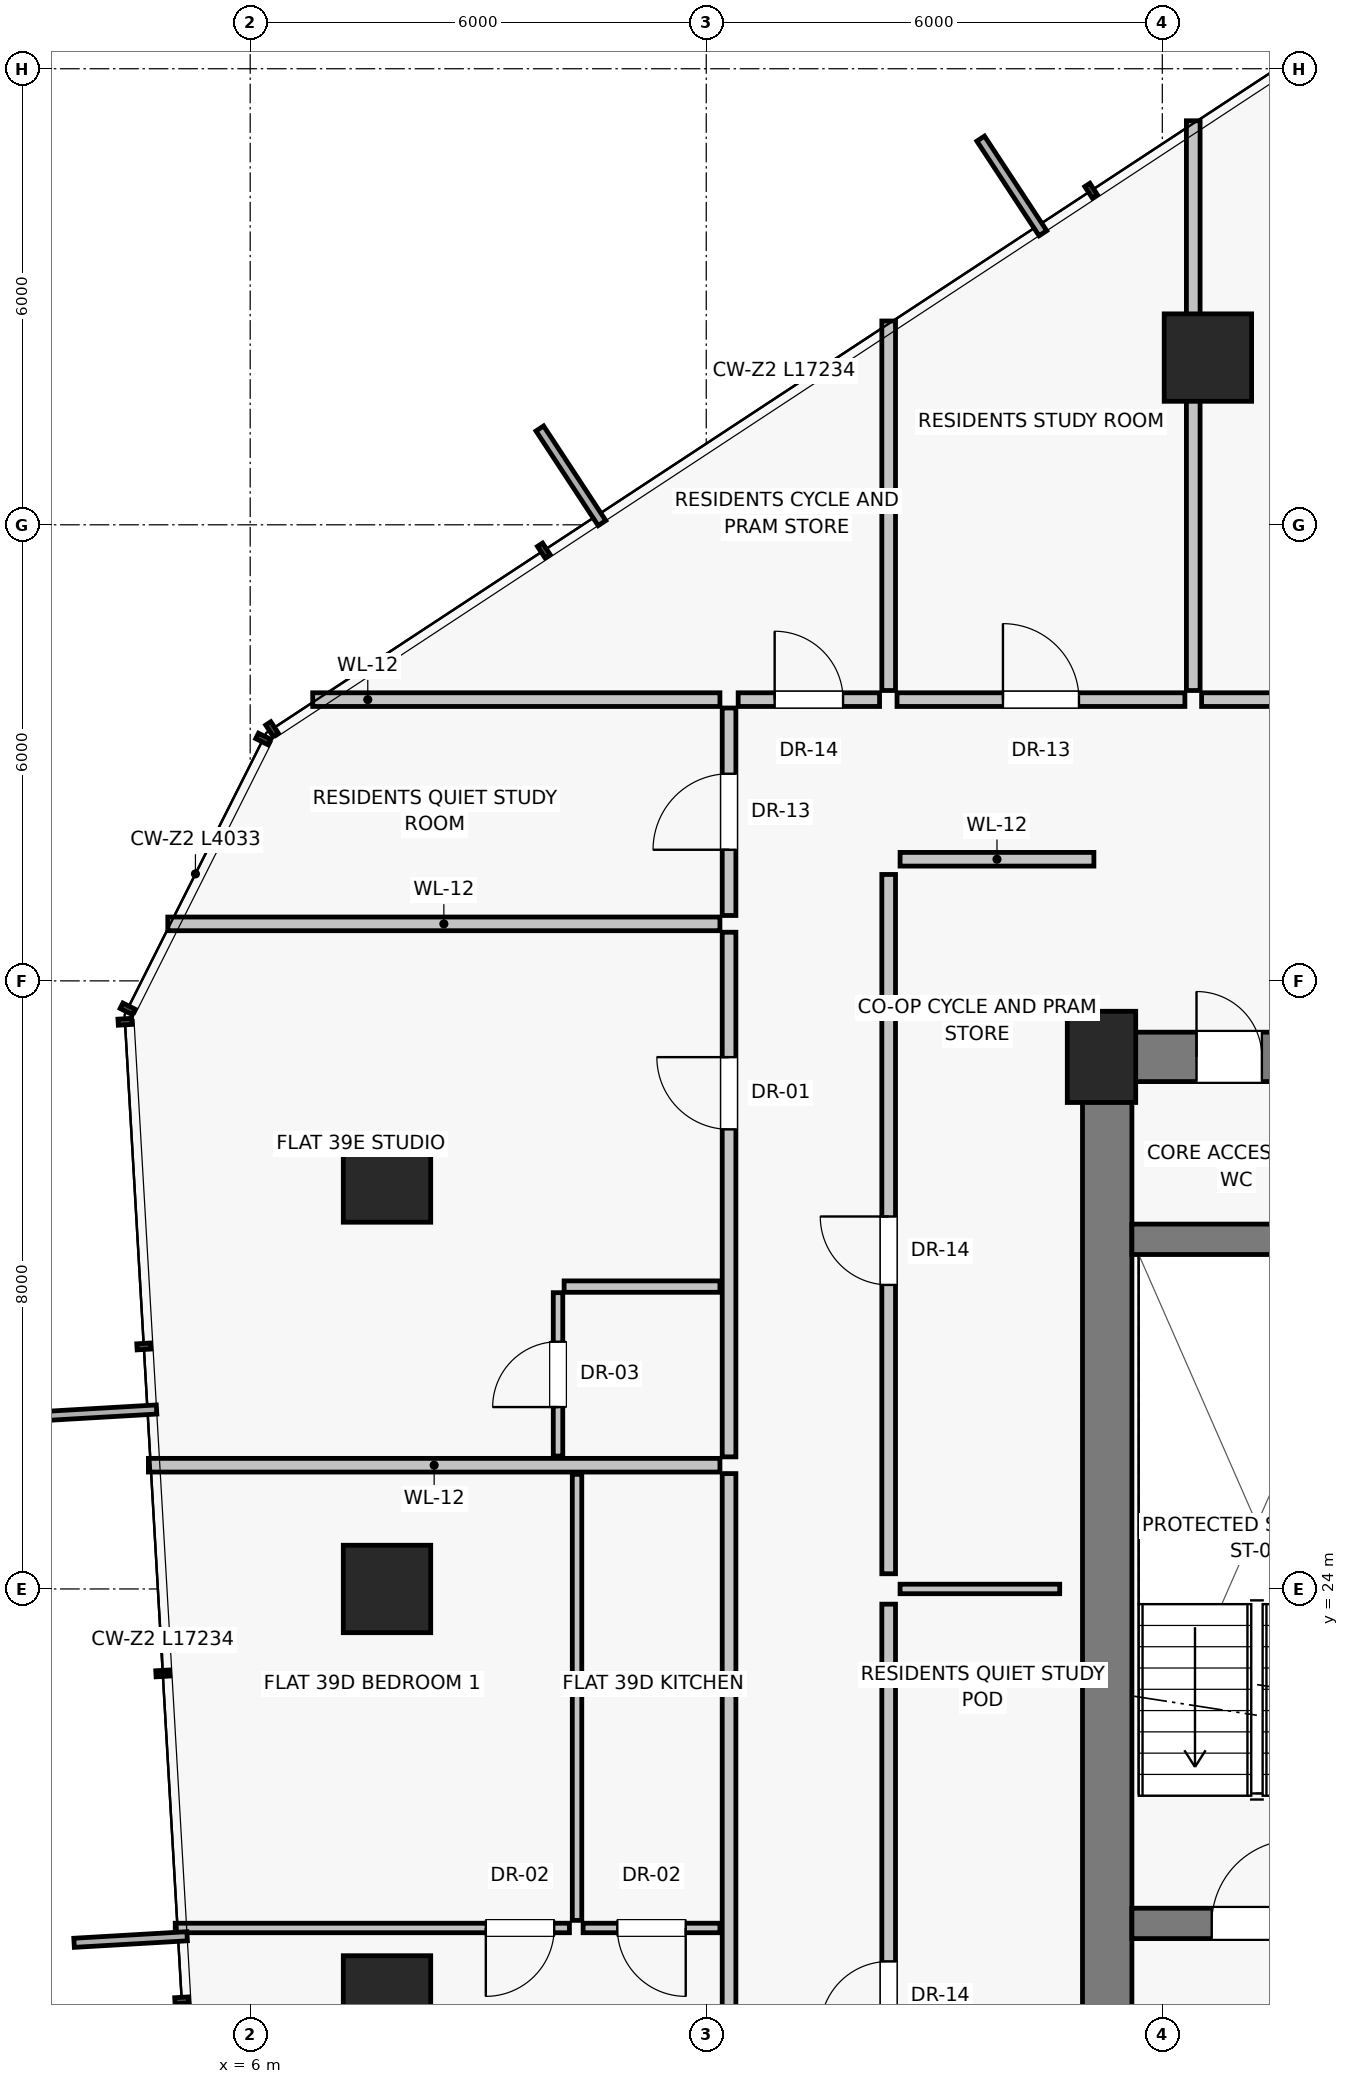
"""IFC4 building model, lengths in metres.
Left out: names, types, materials, properties, quantities, classifications, styles, units other than length and angle.
Written with IfcOpenShell. Run it as: python <this file> out.ifc"""

import sys

from ifc_helpers import new_model, si_unit, direction, frame, frame_2d, origin, origin_2d, place, context, subcontext, project, spatial, rectangle, extrude, source, transform, mapped, element, fill, save


model = new_model("IFC4")
c1 = context("Model", 3, precision=1e-05, world=origin(), true_north=direction((0.0, 1.0)))
c2 = subcontext(c1, "Body", "Model", "MODEL_VIEW")
j1 = project(units=[si_unit("LENGTHUNIT", "METRE"), si_unit("PLANEANGLEUNIT", "RADIAN")], contexts=[c1])
p1 = place(None, origin())
s1 = spatial("IfcSite", under=j1, at=p1, CompositionType="ELEMENT")
p2 = place(p1, origin())
s2 = spatial("IfcBuilding", under=s1, at=p2, CompositionType="ELEMENT")
p3 = place(p2, frame((0.0, 0.0, 139.25)))
s3 = spatial("IfcBuildingStorey", under=s2, at=p3, CompositionType="ELEMENT", Elevation=139.25)
p4 = place(p3, frame((17.2, 31.0, 0.0), z_axis=(0.0, 0.0, 1.0), x_axis=(1.0, 0.0, 0.0)))
e1 = element("IfcColumn", 1, at=p4, inside=s3, PredefinedType="PILASTER", context=c2, shape_type="SweptSolid", body=[
    extrude(rectangle(XDim=0.9, YDim=1.2, at=origin_2d()), origin(), (0.0, 0.0, 1.0), 3.25),
])
for number, where, z_axis, x_axis in (
    (2, (18.6, 40.2, 0.0), (0.0, 0.0, 1.0), (1.0, 0.0, 0.0)),
    (3, (7.8, 29.4, 0.0), (0.0, 0.0, 1.0), (1.0, 0.0, 0.0)),
    (4, (7.8, 24.0, 0.0), (0.0, 0.0, 1.0), (1.0, 0.0, 0.0)),
    (5, (7.8, 18.6, 0.0), (0.0, 0.0, 1.0), (1.0, 0.0, 0.0)),
):
    element("IfcColumn", number, at=place(p3, frame(where, z_axis=z_axis, x_axis=x_axis)), inside=s3, PredefinedType="COLUMN", context=c2, shape_type="SweptSolid", body=[
        extrude(rectangle(XDim=1.15, YDim=1.15, at=origin_2d()), origin(), (0.0, 0.0, 1.0), 3.25),
    ])
p5 = place(p3, frame((17.275, 16.8, 0.0), z_axis=(0.0, 0.0, 1.0), x_axis=(0.0, 1.0, 0.0)))
e6 = element("IfcWall", 6, at=p5, inside=s3, PredefinedType="SHEAR", context=c2, shape_type="SweptSolid", body=[
    extrude(rectangle(XDim=14.2, YDim=0.65, at=frame_2d((7.1, 0.0))), origin(), (0.0, 0.0, 1.0), 3.0),
])
p6 = place(p3, frame((17.2, 31.0, 0.0), z_axis=(0.0, 0.0, 1.0), x_axis=(1.0, 0.0, 0.0)))
e7 = element("IfcWall", 7, at=p6, inside=s3, PredefinedType="SHEAR", context=c2, shape_type="SweptSolid", body=[
    extrude(rectangle(XDim=3.8, YDim=0.65, at=frame_2d((1.9, 0.0))), origin(), (0.0, 0.0, 1.0), 3.0),
])
p7 = place(p6, frame((1.25, 0.0, 0.0)))
e8 = element("IfcOpeningElement", 8, at=p7, cuts=e7, PredefinedType="OPENING", context=c2, shape_type="SweptSolid", body=[
    extrude(rectangle(XDim=0.86, YDim=2.01, at=frame_2d((0.43, 1.005))), frame((0.0, 0.335, 0.0), z_axis=(0.0, -1.0, 0.0), x_axis=(1.0, 0.0, 0.0)), (0.0, 0.0, 1.0), 0.67),
])
p8 = place(p3, frame((17.6, 19.6, 0.0), z_axis=(0.0, 0.0, 1.0), x_axis=(1.0, 0.0, 0.0)))
e9 = element("IfcWall", 9, at=p8, inside=s3, PredefinedType="SHEAR", context=c2, shape_type="SweptSolid", body=[
    extrude(rectangle(XDim=3.4, YDim=0.4, at=frame_2d((1.7, 0.0))), origin(), (0.0, 0.0, 1.0), 3.0),
])
p9 = place(p8, frame((1.05, 0.0, 0.0)))
e10 = element("IfcOpeningElement", 10, at=p9, cuts=e9, PredefinedType="OPENING", context=c2, shape_type="SweptSolid", body=[
    extrude(rectangle(XDim=1.1, YDim=2.03, at=frame_2d((0.55, 1.015))), frame((0.0, 0.21, 0.0), z_axis=(0.0, -1.0, 0.0), x_axis=(1.0, 0.0, 0.0)), (0.0, 0.0, 1.0), 0.42),
])
p10 = place(p3, frame((17.6, 28.6, 0.0), z_axis=(0.0, 0.0, 1.0), x_axis=(1.0, 0.0, 0.0)))
e11 = element("IfcWall", 11, at=p10, inside=s3, PredefinedType="SHEAR", context=c2, shape_type="SweptSolid", body=[
    extrude(rectangle(XDim=3.4, YDim=0.4, at=frame_2d((1.7, 0.0))), origin(), (0.0, 0.0, 1.0), 3.0),
])
p11 = place(p3, frame((14.4, 14.4, 0.0), z_axis=(0.0, 0.0, 1.0), x_axis=(0.0, 1.0, 0.0)))
e12 = element("IfcWall", 12, at=p11, inside=s3, PredefinedType="PARTITIONING", context=c2, shape_type="SweptSolid", body=[
    extrude(rectangle(XDim=9.4, YDim=0.18, at=frame_2d((4.7, 0.0))), origin(), (0.0, 0.0, 1.0), 3.0),
])
p12 = place(p11, frame((3.8, 0.0, 0.0)))
e13 = element("IfcOpeningElement", 13, at=p12, cuts=e12, PredefinedType="OPENING", context=c2, shape_type="SweptSolid", body=[
    extrude(rectangle(XDim=0.9, YDim=2.01, at=frame_2d((0.45, 1.005))), frame((0.0, 0.1, 0.0), z_axis=(0.0, -1.0, 0.0), x_axis=(1.0, 0.0, 0.0)), (0.0, 0.0, 1.0), 0.2),
])
p13 = place(p3, frame((14.4, 24.2, 0.0), z_axis=(0.0, 0.0, 1.0), x_axis=(0.0, 1.0, 0.0)))
e14 = element("IfcWall", 14, at=p13, inside=s3, PredefinedType="PARTITIONING", context=c2, shape_type="SweptSolid", body=[
    extrude(rectangle(XDim=9.2, YDim=0.18, at=frame_2d((4.6, 0.0))), origin(), (0.0, 0.0, 1.0), 3.0),
])
p14 = place(p13, frame((3.8, 0.0, 0.0)))
e15 = element("IfcOpeningElement", 15, at=p14, cuts=e14, PredefinedType="OPENING", context=c2, shape_type="SweptSolid", body=[
    extrude(rectangle(XDim=0.9, YDim=2.01, at=frame_2d((0.45, 1.005))), frame((0.0, 0.1, 0.0), z_axis=(0.0, -1.0, 0.0), x_axis=(1.0, 0.0, 0.0)), (0.0, 0.0, 1.0), 0.2),
])
p15 = place(p3, frame((14.55, 24.0, 0.0), z_axis=(0.0, 0.0, 1.0), x_axis=(1.0, 0.0, 0.0)))
e16 = element("IfcWall", 16, at=p15, inside=s3, PredefinedType="PARTITIONING", context=c2, shape_type="SweptSolid", body=[
    extrude(rectangle(XDim=2.1, YDim=0.125, at=frame_2d((1.05, 0.0))), origin(), (0.0, 0.0, 1.0), 3.0),
])
p16 = place(p3, frame((14.55, 33.6, 0.0), z_axis=(0.0, 0.0, 1.0), x_axis=(1.0, 0.0, 0.0)))
e17 = element("IfcWall", 17, at=p16, inside=s3, PredefinedType="PARTITIONING", context=c2, shape_type="SweptSolid", body=[
    extrude(rectangle(XDim=2.55, YDim=0.18, at=frame_2d((1.275, 0.0))), origin(), (0.0, 0.0, 1.0), 3.0),
])
p17 = place(p3, frame((14.4, 35.82, 0.0), z_axis=(0.0, 0.0, 1.0), x_axis=(0.0, 1.0, 0.0)))
e18 = element("IfcWall", 18, at=p17, inside=s3, PredefinedType="PARTITIONING", context=c2, shape_type="SweptSolid", body=[
    extrude(rectangle(XDim=4.861, YDim=0.18, at=frame_2d((2.431, 0.0))), origin(), (0.0, 0.0, 1.0), 3.0),
])
p18 = place(p3, frame((14.51, 35.7, 0.0), z_axis=(0.0, 0.0, 1.0), x_axis=(1.0, 0.0, 0.0)))
e19 = element("IfcWall", 19, at=p18, inside=s3, PredefinedType="PARTITIONING", context=c2, shape_type="SweptSolid", body=[
    extrude(rectangle(XDim=3.787, YDim=0.18, at=frame_2d((1.894, 0.0))), origin(), (0.0, 0.0, 1.0), 2.58),
])
p19 = place(p18, frame((1.394, 0.0, 0.0)))
e20 = element("IfcOpeningElement", 20, at=p19, cuts=e19, PredefinedType="OPENING", context=c2, shape_type="SweptSolid", body=[
    extrude(rectangle(XDim=1.0, YDim=2.01, at=frame_2d((0.5, 1.005))), frame((0.0, 0.1, 0.0), z_axis=(0.0, -1.0, 0.0), x_axis=(1.0, 0.0, 0.0)), (0.0, 0.0, 1.0), 0.2),
])
p20 = place(p3, frame((18.517, 35.7, 0.0), z_axis=(0.0, 0.0, 1.0), x_axis=(1.0, 0.0, 0.0)))
e21 = element("IfcWall", 21, at=p20, inside=s3, PredefinedType="PARTITIONING", context=c2, shape_type="SweptSolid", body=[
    extrude(rectangle(XDim=6.317, YDim=0.18, at=frame_2d((3.158, 0.0))), origin(), (0.0, 0.0, 1.0), 2.58),
])
p21 = place(p20, frame((2.658, 0.0, 0.0)))
e22 = element("IfcOpeningElement", 22, at=p21, cuts=e21, PredefinedType="OPENING", context=c2, shape_type="SweptSolid", body=[
    extrude(rectangle(XDim=1.0, YDim=2.01, at=frame_2d((0.5, 1.005))), frame((0.0, 0.1, 0.0), z_axis=(0.0, -1.0, 0.0), x_axis=(1.0, 0.0, 0.0)), (0.0, 0.0, 1.0), 0.2),
])
p22 = place(p3, frame((18.407, 35.82, 0.0), z_axis=(0.0, 0.0, 1.0), x_axis=(0.0, 1.0, 0.0)))
e23 = element("IfcWall", 23, at=p22, inside=s3, PredefinedType="PARTITIONING", context=c2, shape_type="SweptSolid", body=[
    extrude(rectangle(XDim=7.495, YDim=0.18, at=frame_2d((3.748, 0.0))), origin(), (0.0, 0.0, 1.0), 2.378),
])
p23 = place(p3, frame((12.18, 35.7, 0.0), z_axis=(0.0, 0.0, 1.0), x_axis=(-1.0, 0.0, 0.0)))
e24 = element("IfcWall", 24, at=p23, inside=s3, PredefinedType="PARTITIONING", context=c2, shape_type="SweptSolid", body=[
    extrude(rectangle(XDim=5.357, YDim=0.18, at=frame_2d((2.679, 0.0))), origin(), (0.0, 0.0, 1.0), 3.0),
])
p24 = place(p3, frame((12.3, 12.21, 0.0), z_axis=(0.0, 0.0, 1.0), x_axis=(0.0, 1.0, 0.0)))
e25 = element("IfcWall", 25, at=p24, inside=s3, PredefinedType="PARTITIONING", context=c2, shape_type="SweptSolid", body=[
    extrude(rectangle(XDim=13.308, YDim=0.18, at=frame_2d((6.654, 0.0))), origin(), (0.0, 0.0, 1.0), 2.58),
])
p25 = place(p24, frame((4.26, 0.0, 0.0)))
e26 = element("IfcOpeningElement", 26, at=p25, cuts=e25, PredefinedType="OPENING", context=c2, shape_type="SweptSolid", body=[
    extrude(rectangle(XDim=0.95, YDim=2.02, at=frame_2d((0.475, 1.01))), frame((0.0, 0.1, 0.0), z_axis=(0.0, -1.0, 0.0), x_axis=(1.0, 0.0, 0.0)), (0.0, 0.0, 1.0), 0.2),
])
p26 = place(p3, frame((12.18, 19.54, 0.0), z_axis=(0.0, 0.0, 1.0), x_axis=(-1.0, 0.0, 0.0)))
e27 = element("IfcWall", 27, at=p26, inside=s3, PredefinedType="PARTITIONING", context=c2, shape_type="SweptSolid", body=[
    extrude(rectangle(XDim=1.8, YDim=0.125, at=frame_2d((0.9, 0.0))), origin(), (0.0, 0.0, 1.0), 3.0),
])
p27 = place(p26, frame((0.45, 0.0, 0.0)))
e28 = element("IfcOpeningElement", 28, at=p27, cuts=e27, PredefinedType="OPENING", context=c2, shape_type="SweptSolid", body=[
    extrude(rectangle(XDim=0.9, YDim=2.01, at=frame_2d((0.45, 1.005))), frame((0.0, 0.073, 0.0), z_axis=(0.0, -1.0, 0.0), x_axis=(1.0, 0.0, 0.0)), (0.0, 0.0, 1.0), 0.145),
])
p28 = place(p3, frame((10.3, 19.64, 0.0), z_axis=(0.0, 0.0, 1.0), x_axis=(0.0, 1.0, 0.0)))
e29 = element("IfcWall", 29, at=p28, inside=s3, PredefinedType="PARTITIONING", context=c2, shape_type="SweptSolid", body=[
    extrude(rectangle(XDim=5.868, YDim=0.125, at=frame_2d((2.934, 0.0))), origin(), (0.0, 0.0, 1.0), 3.0),
])
p29 = place(p3, frame((10.2, 19.54, 0.0), z_axis=(0.0, 0.0, 1.0), x_axis=(-1.0, 0.0, 0.0)))
e30 = element("IfcWall", 30, at=p29, inside=s3, PredefinedType="PARTITIONING", context=c2, shape_type="SweptSolid", body=[
    extrude(rectangle(XDim=5.186, YDim=0.125, at=frame_2d((2.593, 0.0))), origin(), (0.0, 0.0, 1.0), 3.0),
])
p30 = place(p29, frame((0.2, 0.0, 0.0)))
e31 = element("IfcOpeningElement", 31, at=p30, cuts=e30, PredefinedType="OPENING", context=c2, shape_type="SweptSolid", body=[
    extrude(rectangle(XDim=0.9, YDim=2.01, at=frame_2d((0.45, 1.005))), frame((0.0, 0.073, 0.0), z_axis=(0.0, -1.0, 0.0), x_axis=(1.0, 0.0, 0.0)), (0.0, 0.0, 1.0), 0.145),
])
p31 = place(p3, frame((12.18, 25.628, 0.0), z_axis=(0.0, 0.0, 1.0), x_axis=(-1.0, 0.0, 0.0)))
e32 = element("IfcWall", 32, at=p31, inside=s3, PredefinedType="PARTITIONING", context=c2, shape_type="SweptSolid", body=[
    extrude(rectangle(XDim=7.519, YDim=0.18, at=frame_2d((3.76, 0.0))), origin(), (0.0, 0.0, 1.0), 3.0),
])
p32 = place(p3, frame((12.3, 32.86, 0.0), z_axis=(0.0, 0.0, 1.0), x_axis=(0.0, 1.0, 0.0)))
e33 = element("IfcWall", 33, at=p32, inside=s3, PredefinedType="PARTITIONING", context=c2, shape_type="SweptSolid", body=[
    extrude(rectangle(XDim=2.73, YDim=0.18, at=frame_2d((1.365, 0.0))), origin(), (0.0, 0.0, 1.0), 3.0),
])
p33 = place(p32, frame((0.865, 0.0, 0.0)))
e34 = element("IfcOpeningElement", 34, at=p33, cuts=e33, PredefinedType="OPENING", context=c2, shape_type="SweptSolid", body=[
    extrude(rectangle(XDim=1.0, YDim=2.01, at=frame_2d((0.5, 1.005))), frame((0.0, 0.1, 0.0), z_axis=(0.0, -1.0, 0.0), x_axis=(1.0, 0.0, 0.0)), (0.0, 0.0, 1.0), 0.2),
])
p34 = place(p3, frame((12.18, 32.75, 0.0), z_axis=(0.0, 0.0, 1.0), x_axis=(-1.0, 0.0, 0.0)))
e35 = element("IfcWall", 35, at=p34, inside=s3, PredefinedType="PARTITIONING", context=c2, shape_type="SweptSolid", body=[
    extrude(rectangle(XDim=7.264, YDim=0.18, at=frame_2d((3.632, 0.0))), origin(), (0.0, 0.0, 1.0), 3.0),
])
p35 = place(p3, frame((12.3, 25.738, 0.0), z_axis=(0.0, 0.0, 1.0), x_axis=(0.0, 1.0, 0.0)))
e36 = element("IfcWall", 36, at=p35, inside=s3, PredefinedType="PARTITIONING", context=c2, shape_type="SweptSolid", body=[
    extrude(rectangle(XDim=6.902, YDim=0.18, at=frame_2d((3.451, 0.0))), origin(), (0.0, 0.0, 1.0), 2.58),
])
p36 = place(p35, frame((4.309, 0.0, 0.0)))
e37 = element("IfcOpeningElement", 37, at=p36, cuts=e36, PredefinedType="OPENING", context=c2, shape_type="SweptSolid", body=[
    extrude(rectangle(XDim=0.95, YDim=2.02, at=frame_2d((0.475, 1.01))), frame((0.0, 0.1, 0.0), z_axis=(0.0, -1.0, 0.0), x_axis=(1.0, 0.0, 0.0)), (0.0, 0.0, 1.0), 0.2),
])
p37 = place(p3, frame((12.18, 27.978, 0.0), z_axis=(0.0, 0.0, 1.0), x_axis=(-1.0, 0.0, 0.0)))
e38 = element("IfcWall", 38, at=p37, inside=s3, PredefinedType="PARTITIONING", context=c2, shape_type="SweptSolid", body=[
    extrude(rectangle(XDim=2.05, YDim=0.15, at=frame_2d((1.025, 0.0))), origin(), (0.0, 0.0, 1.0), 3.0),
])
p38 = place(p3, frame((10.05, 25.748, 0.0), z_axis=(0.0, 0.0, 1.0), x_axis=(0.0, 1.0, 0.0)))
e39 = element("IfcWall", 39, at=p38, inside=s3, PredefinedType="PARTITIONING", context=c2, shape_type="SweptSolid", body=[
    extrude(rectangle(XDim=2.15, YDim=0.125, at=frame_2d((1.075, 0.0))), origin(), (0.0, 0.0, 1.0), 3.0),
])
p39 = place(p38, frame((0.645, 0.0, 0.0)))
e40 = element("IfcOpeningElement", 40, at=p39, cuts=e39, PredefinedType="OPENING", context=c2, shape_type="SweptSolid", body=[
    extrude(rectangle(XDim=0.86, YDim=2.01, at=frame_2d((0.43, 1.005))), frame((0.0, 0.073, 0.0), z_axis=(0.0, -1.0, 0.0), x_axis=(1.0, 0.0, 0.0)), (0.0, 0.0, 1.0), 0.145),
])
p40 = place(p3, frame((12.42, 35.7, 0.0), z_axis=(0.0, 0.0, 1.0), x_axis=(1.0, 0.0, 0.0)))
e41 = element("IfcWall", 41, at=p40, inside=s3, PredefinedType="PARTITIONING", context=c2, shape_type="SweptSolid", body=[
    extrude(rectangle(XDim=1.86, YDim=0.18, at=frame_2d((0.93, 0.0))), origin(), (0.0, 0.0, 1.0), 3.0),
])
p41 = place(p40, frame((0.48, 0.0, 0.0)))
e42 = element("IfcOpeningElement", 42, at=p41, cuts=e41, PredefinedType="OPENING", context=c2, shape_type="SweptSolid", body=[
    extrude(rectangle(XDim=0.9, YDim=2.01, at=frame_2d((0.45, 1.005))), frame((0.0, 0.1, 0.0), z_axis=(0.0, -1.0, 0.0), x_axis=(1.0, 0.0, 0.0)), (0.0, 0.0, 1.0), 0.2),
])
m1 = source(origin(), c2, "Body", "SweptSolid", [
    extrude(rectangle(XDim=0.86, YDim=2.01, at=frame_2d((0.43, 1.005))), frame((0.0, 0.025, 0.0), z_axis=(0.0, -1.0, 0.0), x_axis=(1.0, 0.0, 0.0)), (0.0, 0.0, 1.0), 0.05),
])
p42 = place(p7, origin())
e43 = element("IfcDoor", 43, at=p42, inside=s3, OperationType="SINGLE_SWING_LEFT", PredefinedType="DOOR", context=c2, shape_type="MappedRepresentation", body=[
    mapped(m1, transform((0.0, 0.0, 0.0), scale=1.0)),
])
fill(e8, e43)
m2 = source(origin(), c2, "Body", "SweptSolid", [
    extrude(rectangle(XDim=1.1, YDim=2.03, at=frame_2d((0.55, 1.015))), frame((0.0, 0.025, 0.0), z_axis=(0.0, -1.0, 0.0), x_axis=(1.0, 0.0, 0.0)), (0.0, 0.0, 1.0), 0.05),
])
p43 = place(p9, origin())
e44 = element("IfcDoor", 44, at=p43, inside=s3, OperationType="SINGLE_SWING_RIGHT", PredefinedType="DOOR", context=c2, shape_type="MappedRepresentation", body=[
    mapped(m2, transform((0.0, 0.0, 0.0), scale=1.0)),
])
fill(e10, e44)
m3 = source(origin(), c2, "Body", "SweptSolid", [
    extrude(rectangle(XDim=0.9, YDim=2.01, at=frame_2d((0.45, 1.005))), frame((0.0, 0.025, 0.0), z_axis=(0.0, -1.0, 0.0), x_axis=(1.0, 0.0, 0.0)), (0.0, 0.0, 1.0), 0.05),
])
p44 = place(p12, origin())
e45 = element("IfcDoor", 45, at=p44, inside=s3, OperationType="SINGLE_SWING_LEFT", PredefinedType="DOOR", context=c2, shape_type="MappedRepresentation", body=[
    mapped(m3, transform((0.0, 0.0, 0.0), scale=1.0)),
])
fill(e13, e45)
p45 = place(p14, origin())
e46 = element("IfcDoor", 46, at=p45, inside=s3, OperationType="SINGLE_SWING_RIGHT", PredefinedType="DOOR", context=c2, shape_type="MappedRepresentation", body=[
    mapped(m3, transform((0.0, 0.0, 0.0), scale=1.0)),
])
fill(e15, e46)
m4 = source(origin(), c2, "Body", "SweptSolid", [
    extrude(rectangle(XDim=1.0, YDim=2.01, at=frame_2d((0.5, 1.005))), frame((0.0, 0.025, 0.0), z_axis=(0.0, -1.0, 0.0), x_axis=(1.0, 0.0, 0.0)), (0.0, 0.0, 1.0), 0.05),
])
p46 = place(p19, origin())
e47 = element("IfcDoor", 47, at=p46, inside=s3, OperationType="SINGLE_SWING_LEFT", PredefinedType="DOOR", context=c2, shape_type="MappedRepresentation", body=[
    mapped(m4, transform((0.0, 0.0, 0.0), scale=1.0)),
])
fill(e20, e47)
p47 = place(p27, origin())
e48 = element("IfcDoor", 48, at=p47, inside=s3, OperationType="SINGLE_SWING_LEFT", PredefinedType="DOOR", context=c2, shape_type="MappedRepresentation", body=[
    mapped(m3, transform((0.0, 0.0, 0.0), scale=1.0)),
])
fill(e28, e48)
p48 = place(p30, origin())
e49 = element("IfcDoor", 49, at=p48, inside=s3, OperationType="SINGLE_SWING_RIGHT", PredefinedType="DOOR", context=c2, shape_type="MappedRepresentation", body=[
    mapped(m3, transform((0.0, 0.0, 0.0), scale=1.0)),
])
fill(e31, e49)
p49 = place(p33, origin())
e50 = element("IfcDoor", 50, at=p49, inside=s3, OperationType="SINGLE_SWING_LEFT", PredefinedType="DOOR", context=c2, shape_type="MappedRepresentation", body=[
    mapped(m4, transform((0.0, 0.0, 0.0), scale=1.0)),
])
fill(e34, e50)
m5 = source(origin(), c2, "Body", "SweptSolid", [
    extrude(rectangle(XDim=0.95, YDim=2.02, at=frame_2d((0.475, 1.01))), frame((0.0, 0.025, 0.0), z_axis=(0.0, -1.0, 0.0), x_axis=(1.0, 0.0, 0.0)), (0.0, 0.0, 1.0), 0.05),
])
p50 = place(p36, origin())
e51 = element("IfcDoor", 51, at=p50, inside=s3, OperationType="SINGLE_SWING_RIGHT", PredefinedType="DOOR", context=c2, shape_type="MappedRepresentation", body=[
    mapped(m5, transform((0.0, 0.0, 0.0), scale=1.0)),
])
fill(e37, e51)
p51 = place(p39, origin())
e52 = element("IfcDoor", 52, at=p51, inside=s3, OperationType="SINGLE_SWING_LEFT", PredefinedType="DOOR", context=c2, shape_type="MappedRepresentation", body=[
    mapped(m1, transform((0.0, 0.0, 0.0), scale=1.0)),
])
fill(e40, e52)
p52 = place(p41, origin())
e53 = element("IfcDoor", 53, at=p52, inside=s3, OperationType="SINGLE_SWING_LEFT", PredefinedType="DOOR", context=c2, shape_type="MappedRepresentation", body=[
    mapped(m3, transform((0.0, 0.0, 0.0), scale=1.0)),
])
fill(e42, e53)
save(model, sys.argv[1])
